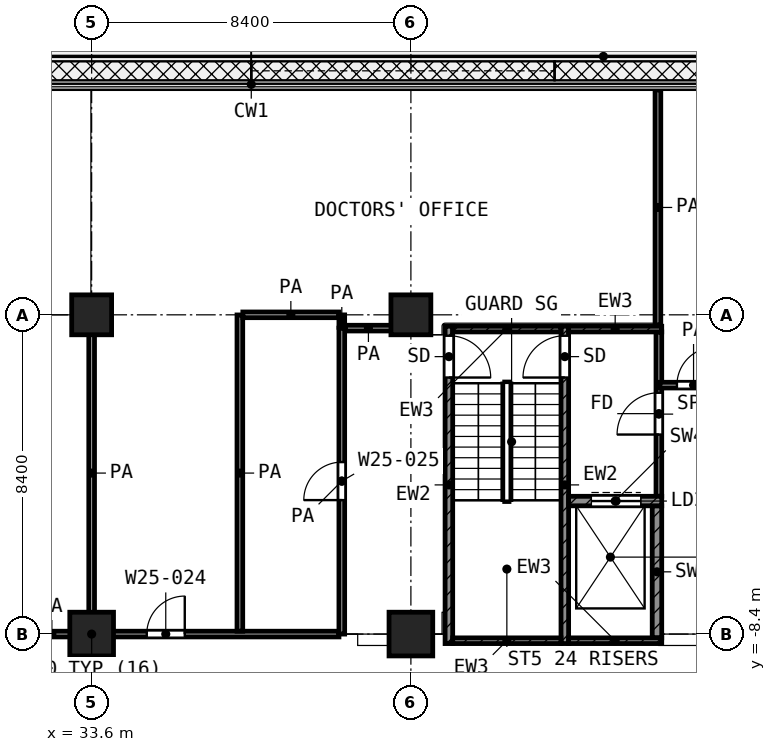
"""IFC4 building model, lengths in metres.
Left out: names, types, materials, properties, quantities, classifications, styles, units other than length and angle.
Written with IfcOpenShell. Run it as: python <this file> out.ifc"""

import sys

from ifc_helpers import new_model, si_unit, direction, frame, frame_2d, origin, origin_2d, place, context, subcontext, project, spatial, rectangle, extrude, element, fill, save


model = new_model("IFC4")
c1 = context("Model", 3, precision=1e-05, world=origin(), true_north=direction((0.0, 1.0)))
c2 = subcontext(c1, "Body", "Model", "MODEL_VIEW")
j1 = project(units=[si_unit("LENGTHUNIT", "METRE"), si_unit("PLANEANGLEUNIT", "RADIAN")], contexts=[c1])
p1 = place(None, origin())
s1 = spatial("IfcSite", under=j1, at=p1, CompositionType="ELEMENT")
p2 = place(p1, origin())
s2 = spatial("IfcBuilding", under=s1, at=p2, CompositionType="ELEMENT")
p3 = place(p2, frame((0.0, 0.0, 132.4)))
s3 = spatial("IfcBuildingStorey", under=s2, at=p3, CompositionType="ELEMENT", Elevation=132.4)
for number, where, z_axis, x_axis in (
    (1, (33.6, 0.0, 0.0), (0.0, 0.0, 1.0), (1.0, 0.0, 0.0)),
    (2, (42.0, 0.0, 0.0), (0.0, 0.0, 1.0), (1.0, 0.0, 0.0)),
):
    element("IfcColumn", number, at=place(p3, frame(where, z_axis=z_axis, x_axis=x_axis)), inside=s3, PredefinedType="COLUMN", context=c2, shape_type="SweptSolid", body=[
        extrude(rectangle(XDim=1.05, YDim=1.05, at=origin_2d()), origin(), (0.0, 0.0, 1.0), 4.2),
    ])
for number, where, z_axis, x_axis in (
    (3, (33.6, -8.4, 0.0), (0.0, 0.0, 1.0), (1.0, 0.0, 0.0)),
    (4, (42.0, -8.4, 0.0), (0.0, 0.0, 1.0), (1.0, 0.0, 0.0)),
):
    element("IfcColumn", number, at=place(p3, frame(where, z_axis=z_axis, x_axis=x_axis)), inside=s3, PredefinedType="COLUMN", context=c2, shape_type="SweptSolid", body=[
        extrude(rectangle(XDim=1.15, YDim=1.15, at=origin_2d()), origin(), (0.0, 0.0, 1.0), 4.2),
    ])
p4 = place(p3, frame((43.0, -8.65, 0.0), z_axis=(0.0, 0.0, 1.0), x_axis=(0.0, 1.0, 0.0)))
e5 = element("IfcWall", 5, at=p4, inside=s3, PredefinedType="SHEAR", context=c2, shape_type="SweptSolid", body=[
    extrude(rectangle(XDim=8.35, YDim=0.2, at=frame_2d((4.175, 0.0))), origin(), (0.0, 0.0, 1.0), 3.6),
])
p5 = place(p4, frame((7.0, 0.0, 0.0)))
e6 = element("IfcOpeningElement", 6, at=p5, cuts=e5, PredefinedType="OPENING", context=c2, shape_type="SweptSolid", body=[
    extrude(rectangle(XDim=1.1, YDim=2.1, at=frame_2d((0.55, 1.05))), frame((0.0, 0.11, 0.0), z_axis=(0.0, -1.0, 0.0), x_axis=(1.0, 0.0, 0.0)), (0.0, 0.0, 1.0), 0.22),
])
p6 = place(p3, frame((46.05, -8.65, 0.0), z_axis=(0.0, 0.0, 1.0), x_axis=(0.0, 1.0, 0.0)))
e7 = element("IfcWall", 7, at=p6, inside=s3, PredefinedType="SHEAR", context=c2, shape_type="SweptSolid", body=[
    extrude(rectangle(XDim=8.35, YDim=0.2, at=frame_2d((4.175, 0.0))), origin(), (0.0, 0.0, 1.0), 3.6),
])
p7 = place(p6, frame((7.0, 0.0, 0.0)))
e8 = element("IfcOpeningElement", 8, at=p7, cuts=e7, PredefinedType="OPENING", context=c2, shape_type="SweptSolid", body=[
    extrude(rectangle(XDim=1.1, YDim=2.1, at=frame_2d((0.55, 1.05))), frame((0.0, 0.11, 0.0), z_axis=(0.0, -1.0, 0.0), x_axis=(1.0, 0.0, 0.0)), (0.0, 0.0, 1.0), 0.22),
])
p8 = place(p3, frame((43.1, -0.375, 0.0), z_axis=(0.0, 0.0, 1.0), x_axis=(1.0, 0.0, 0.0)))
e9 = element("IfcWall", 9, at=p8, inside=s3, PredefinedType="SHEAR", context=c2, shape_type="SweptSolid", body=[
    extrude(rectangle(XDim=2.85, YDim=0.15, at=frame_2d((1.425, 0.0))), origin(), (0.0, 0.0, 1.0), 3.6),
])
p9 = place(p3, frame((46.15, -0.375, 0.0), z_axis=(0.0, 0.0, 1.0), x_axis=(1.0, 0.0, 0.0)))
e10 = element("IfcWall", 10, at=p9, inside=s3, PredefinedType="SHEAR", context=c2, shape_type="SweptSolid", body=[
    extrude(rectangle(XDim=2.45, YDim=0.15, at=frame_2d((1.225, 0.0))), origin(), (0.0, 0.0, 1.0), 3.6),
])
p10 = place(p3, frame((43.1, -8.575, 0.0), z_axis=(0.0, 0.0, 1.0), x_axis=(1.0, 0.0, 0.0)))
e11 = element("IfcWall", 11, at=p10, inside=s3, PredefinedType="SHEAR", context=c2, shape_type="SweptSolid", body=[
    extrude(rectangle(XDim=2.85, YDim=0.15, at=frame_2d((1.425, 0.0))), origin(), (0.0, 0.0, 1.0), 3.6),
])
p11 = place(p3, frame((46.15, -8.575, 0.0), z_axis=(0.0, 0.0, 1.0), x_axis=(1.0, 0.0, 0.0)))
e12 = element("IfcWall", 12, at=p11, inside=s3, PredefinedType="SHEAR", context=c2, shape_type="SweptSolid", body=[
    extrude(rectangle(XDim=2.45, YDim=0.15, at=frame_2d((1.225, 0.0))), origin(), (0.0, 0.0, 1.0), 3.6),
])
p12 = place(p3, frame((46.15, -4.9, 0.0), z_axis=(0.0, 0.0, 1.0), x_axis=(1.0, 0.0, 0.0)))
e13 = element("IfcWall", 13, at=p12, inside=s3, PredefinedType="SHEAR", context=c2, shape_type="SweptSolid", body=[
    extrude(rectangle(XDim=2.45, YDim=0.25, at=frame_2d((1.225, 0.0))), origin(), (0.0, 0.0, 1.0), 3.6),
])
p13 = place(p12, frame((0.6, 0.0, 0.0)))
e14 = element("IfcOpeningElement", 14, at=p13, cuts=e13, PredefinedType="OPENING", context=c2, shape_type="SweptSolid", body=[
    extrude(rectangle(XDim=1.3, YDim=2.1, at=frame_2d((0.65, 1.05))), frame((0.0, 0.135, 0.0), z_axis=(0.0, -1.0, 0.0), x_axis=(1.0, 0.0, 0.0)), (0.0, 0.0, 1.0), 0.27),
])
p14 = place(p3, frame((48.475, -8.5, 0.0), z_axis=(0.0, 0.0, 1.0), x_axis=(0.0, 1.0, 0.0)))
e15 = element("IfcWall", 15, at=p14, inside=s3, PredefinedType="SHEAR", context=c2, shape_type="SweptSolid", body=[
    extrude(rectangle(XDim=3.475, YDim=0.25, at=frame_2d((1.738, 0.0))), origin(), (0.0, 0.0, 1.0), 3.6),
])
p15 = place(p3, frame((48.525, -4.775, 0.0), z_axis=(0.0, 0.0, 1.0), x_axis=(0.0, 1.0, 0.0)))
e16 = element("IfcWall", 16, at=p15, inside=s3, PredefinedType="PARTITIONING", context=c2, shape_type="SweptSolid", body=[
    extrude(rectangle(XDim=4.325, YDim=0.15, at=frame_2d((2.163, 0.0))), origin(), (0.0, 0.0, 1.0), 3.6),
])
p16 = place(p15, frame((1.625, 0.0, 0.0)))
e17 = element("IfcOpeningElement", 17, at=p16, cuts=e16, PredefinedType="OPENING", context=c2, shape_type="SweptSolid", body=[
    extrude(rectangle(XDim=1.1, YDim=2.1, at=frame_2d((0.55, 1.05))), frame((0.0, 0.085, 0.0), z_axis=(0.0, -1.0, 0.0), x_axis=(1.0, 0.0, 0.0)), (0.0, 0.0, 1.0), 0.17),
])
p17 = place(p3, frame((25.0, -8.4, 0.0), z_axis=(0.0, 0.0, 1.0), x_axis=(1.0, 0.0, 0.0)))
e18 = element("IfcWall", 18, at=p17, inside=s3, PredefinedType="PARTITIONING", context=c2, shape_type="SweptSolid", body=[
    extrude(rectangle(XDim=15.107, YDim=0.15, at=frame_2d((7.553, 0.0))), origin(), (0.0, 0.0, 1.0), 3.6),
])
p18 = place(p17, frame((3.8, 0.0, 0.0)))
e19 = element("IfcOpeningElement", 19, at=p18, cuts=e18, PredefinedType="OPENING", context=c2, shape_type="SweptSolid", body=[
    extrude(rectangle(XDim=1.2, YDim=2.1, at=frame_2d((0.6, 1.05))), frame((0.0, 0.085, 0.0), z_axis=(0.0, -1.0, 0.0), x_axis=(1.0, 0.0, 0.0)), (0.0, 0.0, 1.0), 0.17),
])
p19 = place(p17, frame((10.05, 0.0, 0.0)))
e20 = element("IfcOpeningElement", 20, at=p19, cuts=e18, PredefinedType="OPENING", context=c2, shape_type="SweptSolid", body=[
    extrude(rectangle(XDim=1.0, YDim=2.1, at=frame_2d((0.5, 1.05))), frame((0.0, 0.085, 0.0), z_axis=(0.0, -1.0, 0.0), x_axis=(1.0, 0.0, 0.0)), (0.0, 0.0, 1.0), 0.17),
])
p20 = place(p3, frame((48.55, -1.85, 0.0), z_axis=(0.0, 0.0, 1.0), x_axis=(1.0, 0.0, 0.0)))
e21 = element("IfcWall", 21, at=p20, inside=s3, PredefinedType="PARTITIONING", context=c2, shape_type="SweptSolid", body=[
    extrude(rectangle(XDim=1.775, YDim=0.15, at=frame_2d((0.887, 0.0))), origin(), (0.0, 0.0, 1.0), 3.6),
])
p21 = place(p20, frame((0.45, 0.0, 0.0)))
e22 = element("IfcOpeningElement", 22, at=p21, cuts=e21, PredefinedType="OPENING", context=c2, shape_type="SweptSolid", body=[
    extrude(rectangle(XDim=1.0, YDim=2.1, at=frame_2d((0.5, 1.05))), frame((0.0, 0.085, 0.0), z_axis=(0.0, -1.0, 0.0), x_axis=(1.0, 0.0, 0.0)), (0.0, 0.0, 1.0), 0.17),
])
p22 = place(p3, frame((40.277, -0.35, 0.0), z_axis=(0.0, 0.0, 1.0), x_axis=(1.0, 0.0, 0.0)))
e23 = element("IfcWall", 23, at=p22, inside=s3, PredefinedType="PARTITIONING", context=c2, shape_type="SweptSolid", body=[
    extrude(rectangle(XDim=1.211, YDim=0.15, at=frame_2d((0.605, 0.0))), origin(), (0.0, 0.0, 1.0), 3.6),
])
p23 = place(p3, frame((37.578, 0.0, 0.0), z_axis=(0.0, 0.0, 1.0), x_axis=(1.0, 0.0, 0.0)))
e24 = element("IfcWall", 24, at=p23, inside=s3, PredefinedType="PARTITIONING", context=c2, shape_type="SweptSolid", body=[
    extrude(rectangle(XDim=2.527, YDim=0.15, at=frame_2d((1.264, 0.0))), origin(), (0.0, 0.0, 1.0), 3.6),
])
for number, where, z_axis, x_axis in (
    (25, (33.6, -8.325, 0.0), (0.0, 0.0, 1.0), (0.0, 1.0, 0.0)),
    (26, (37.5, -8.325, 0.0), (0.0, 0.0, 1.0), (0.0, 1.0, 0.0)),
):
    element("IfcWall", number, at=place(p3, frame(where, z_axis=z_axis, x_axis=x_axis)), inside=s3, PredefinedType="PARTITIONING", context=c2, shape_type="SweptSolid", body=[
        extrude(rectangle(XDim=8.322, YDim=0.15, at=frame_2d((4.161, 0.0))), origin(), (0.0, 0.0, 1.0), 3.6),
    ])
p24 = place(p3, frame((40.182, -8.4, 0.0), z_axis=(0.0, 0.0, 1.0), x_axis=(0.0, 1.0, 0.0)))
e27 = element("IfcWall", 27, at=p24, inside=s3, PredefinedType="PARTITIONING", context=c2, shape_type="SweptSolid", body=[
    extrude(rectangle(XDim=8.05, YDim=0.15, at=frame_2d((4.025, 0.0))), origin(), (0.0, 0.0, 1.0), 3.6),
])
p25 = place(p24, frame((3.525, 0.0, 0.0)))
e28 = element("IfcOpeningElement", 28, at=p25, cuts=e27, PredefinedType="OPENING", context=c2, shape_type="SweptSolid", body=[
    extrude(rectangle(XDim=1.0, YDim=2.1, at=frame_2d((0.5, 1.05))), frame((0.0, 0.085, 0.0), z_axis=(0.0, -1.0, 0.0), x_axis=(1.0, 0.0, 0.0)), (0.0, 0.0, 1.0), 0.17),
])
p26 = place(p3, frame((40.182, -0.33, 0.0), z_axis=(0.0, 0.0, 1.0), x_axis=(0.0, 1.0, 0.0)))
e29 = element("IfcWall", 29, at=p26, inside=s3, PredefinedType="PARTITIONING", context=c2, shape_type="SweptSolid", body=[
    extrude(rectangle(XDim=0.328, YDim=0.15, at=frame_2d((0.164, 0.0))), origin(), (0.0, 0.0, 1.0), 3.6),
])
p27 = place(p3, frame((48.5, -0.27, 0.0), z_axis=(0.0, 0.0, 1.0), x_axis=(0.0, 1.0, 0.0)))
e30 = element("IfcWall", 30, at=p27, inside=s3, PredefinedType="PARTITIONING", context=c2, shape_type="SweptSolid", body=[
    extrude(rectangle(XDim=6.19, YDim=0.15, at=frame_2d((3.095, 0.0))), origin(), (0.0, 0.0, 1.0), 3.6),
])
p28 = place(p5, frame((1.1, 0.0, 0.0), z_axis=(0.0, 0.0, 1.0), x_axis=(-1.0, 0.0, 0.0)))
e31 = element("IfcDoor", 31, at=p28, inside=s3, OperationType="SINGLE_SWING_LEFT", PredefinedType="DOOR", context=c2, shape_type="SweptSolid", body=[
    extrude(rectangle(XDim=1.1, YDim=2.1, at=frame_2d((0.55, 1.05))), frame((0.0, 0.025, 0.0), z_axis=(0.0, -1.0, 0.0), x_axis=(1.0, 0.0, 0.0)), (0.0, 0.0, 1.0), 0.05),
])
fill(e6, e31)
p29 = place(p7, origin())
e32 = element("IfcDoor", 32, at=p29, inside=s3, OperationType="SINGLE_SWING_LEFT", PredefinedType="DOOR", context=c2, shape_type="SweptSolid", body=[
    extrude(rectangle(XDim=1.1, YDim=2.1, at=frame_2d((0.55, 1.05))), frame((0.0, 0.025, 0.0), z_axis=(0.0, -1.0, 0.0), x_axis=(1.0, 0.0, 0.0)), (0.0, 0.0, 1.0), 0.05),
])
fill(e8, e32)
p30 = place(p13, origin())
e33 = element("IfcDoor", 33, at=p30, inside=s3, OperationType="DOUBLE_DOOR_SLIDING", PredefinedType="DOOR", context=c2, shape_type="SweptSolid", body=[
    extrude(rectangle(XDim=1.3, YDim=2.1, at=frame_2d((0.65, 1.05))), frame((0.0, 0.025, 0.0), z_axis=(0.0, -1.0, 0.0), x_axis=(1.0, 0.0, 0.0)), (0.0, 0.0, 1.0), 0.05),
])
fill(e14, e33)
p31 = place(p16, origin())
e34 = element("IfcDoor", 34, at=p31, inside=s3, OperationType="SINGLE_SWING_LEFT", PredefinedType="DOOR", context=c2, shape_type="SweptSolid", body=[
    extrude(rectangle(XDim=1.1, YDim=2.1, at=frame_2d((0.55, 1.05))), frame((0.0, 0.025, 0.0), z_axis=(0.0, -1.0, 0.0), x_axis=(1.0, 0.0, 0.0)), (0.0, 0.0, 1.0), 0.05),
])
fill(e17, e34)
p32 = place(p19, origin())
e35 = element("IfcDoor", 35, at=p32, inside=s3, OperationType="SINGLE_SWING_RIGHT", PredefinedType="DOOR", context=c2, shape_type="SweptSolid", body=[
    extrude(rectangle(XDim=1.0, YDim=2.1, at=frame_2d((0.5, 1.05))), frame((0.0, 0.025, 0.0), z_axis=(0.0, -1.0, 0.0), x_axis=(1.0, 0.0, 0.0)), (0.0, 0.0, 1.0), 0.05),
])
fill(e20, e35)
p33 = place(p25, origin())
e36 = element("IfcDoor", 36, at=p33, inside=s3, OperationType="SINGLE_SWING_LEFT", PredefinedType="DOOR", context=c2, shape_type="SweptSolid", body=[
    extrude(rectangle(XDim=1.0, YDim=2.1, at=frame_2d((0.5, 1.05))), frame((0.0, 0.025, 0.0), z_axis=(0.0, -1.0, 0.0), x_axis=(1.0, 0.0, 0.0)), (0.0, 0.0, 1.0), 0.05),
])
fill(e28, e36)
p34 = place(p21, origin())
e37 = element("IfcDoor", 37, at=p34, inside=s3, OperationType="SINGLE_SWING_RIGHT", PredefinedType="DOOR", context=c2, shape_type="SweptSolid", body=[
    extrude(rectangle(XDim=1.0, YDim=2.1, at=frame_2d((0.5, 1.05))), frame((0.0, 0.025, 0.0), z_axis=(0.0, -1.0, 0.0), x_axis=(1.0, 0.0, 0.0)), (0.0, 0.0, 1.0), 0.05),
])
fill(e22, e37)
save(model, sys.argv[1])
